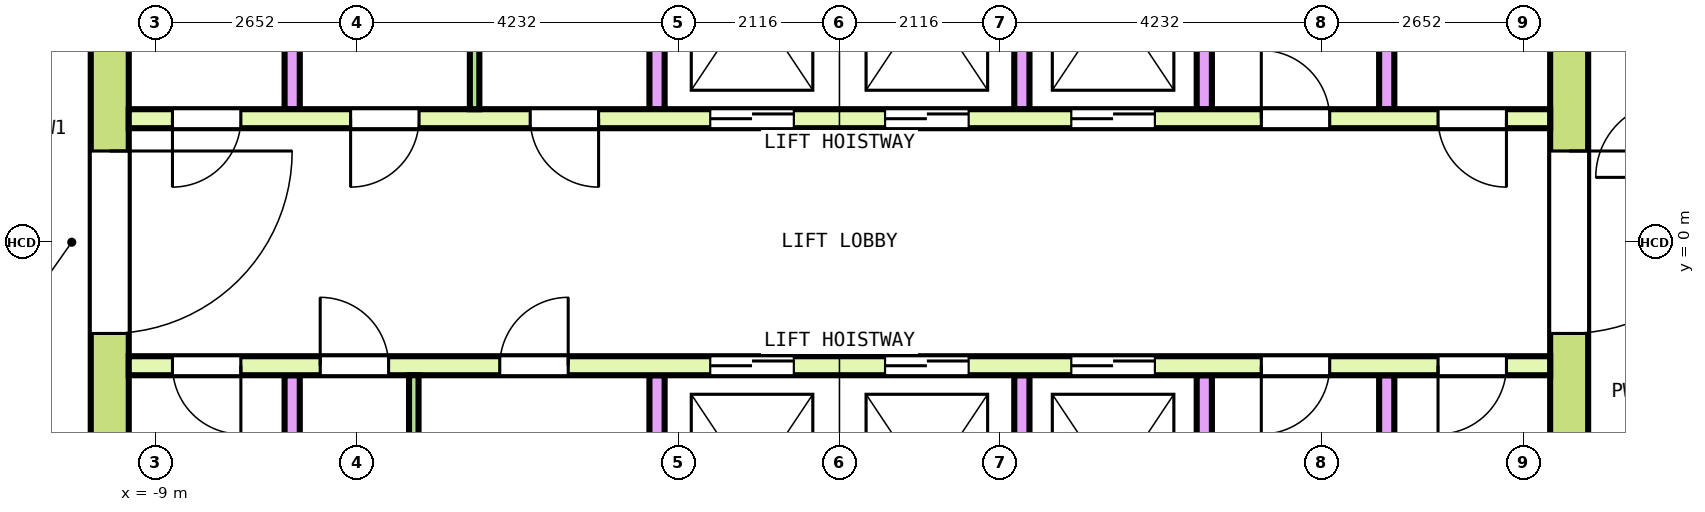
"""IFC4 building model, lengths in metres.
Left out: names, types, materials, properties, quantities, classifications, styles, units other than length and angle.
Written with IfcOpenShell. Run it as: python <this file> out.ifc"""

import sys

from ifc_helpers import new_model, si_unit, direction, frame, frame_2d, origin, place, context, subcontext, project, spatial, rectangle, extrude, element, fill, save


model = new_model("IFC4")
c1 = context("Model", 3, precision=1e-05, world=origin(), true_north=direction((0.0, 1.0)))
c2 = subcontext(c1, "Body", "Model", "MODEL_VIEW")
j1 = project(units=[si_unit("LENGTHUNIT", "METRE"), si_unit("PLANEANGLEUNIT", "RADIAN")], contexts=[c1])
p1 = place(None, origin())
s1 = spatial("IfcSite", under=j1, at=p1, CompositionType="ELEMENT")
p2 = place(p1, origin())
s2 = spatial("IfcBuilding", under=s1, at=p2, CompositionType="ELEMENT")
p3 = place(p2, frame((0.0, 0.0, 267.0)))
s3 = spatial("IfcBuildingStorey", under=s2, at=p3, CompositionType="ELEMENT", Elevation=267.0)
p4 = place(p3, frame((-9.6, -7.85, 0.0), z_axis=(0.0, 0.0, 1.0), x_axis=(0.0, 1.0, 0.0)))
e1 = element("IfcWall", 1, at=p4, inside=s3, PredefinedType="SHEAR", context=c2, shape_type="SweptSolid", body=[
    extrude(rectangle(XDim=15.7, YDim=0.5, at=frame_2d((7.85, 0.0))), origin(), (0.0, 0.0, 1.0), 3.7),
])
p5 = place(p4, frame((6.65, 0.0, 0.0)))
e2 = element("IfcOpeningElement", 2, at=p5, cuts=e1, PredefinedType="OPENING", context=c2, shape_type="SweptSolid", body=[
    extrude(rectangle(XDim=2.4, YDim=2.1, at=frame_2d((1.2, 1.05))), frame((0.0, 0.26, 0.0), z_axis=(0.0, -1.0, 0.0), x_axis=(1.0, 0.0, 0.0)), (0.0, 0.0, 1.0), 0.52),
])
p6 = place(p4, frame((13.55, 0.0, 0.0)))
e3 = element("IfcOpeningElement", 3, at=p6, cuts=e1, PredefinedType="OPENING", context=c2, shape_type="SweptSolid", body=[
    extrude(rectangle(XDim=1.2, YDim=2.1, at=frame_2d((0.6, 1.05))), frame((0.0, 0.26, 0.0), z_axis=(0.0, -1.0, 0.0), x_axis=(1.0, 0.0, 0.0)), (0.0, 0.0, 1.0), 0.52),
])
p7 = place(p4, frame((0.95, 0.0, 0.0)))
e4 = element("IfcOpeningElement", 4, at=p7, cuts=e1, PredefinedType="OPENING", context=c2, shape_type="SweptSolid", body=[
    extrude(rectangle(XDim=1.2, YDim=2.1, at=frame_2d((0.6, 1.05))), frame((0.0, 0.26, 0.0), z_axis=(0.0, -1.0, 0.0), x_axis=(1.0, 0.0, 0.0)), (0.0, 0.0, 1.0), 0.52),
])
p8 = place(p3, frame((9.6, -7.85, 0.0), z_axis=(0.0, 0.0, 1.0), x_axis=(0.0, 1.0, 0.0)))
e5 = element("IfcWall", 5, at=p8, inside=s3, PredefinedType="SHEAR", context=c2, shape_type="SweptSolid", body=[
    extrude(rectangle(XDim=15.7, YDim=0.5, at=frame_2d((7.85, 0.0))), origin(), (0.0, 0.0, 1.0), 3.7),
])
p9 = place(p8, frame((6.65, 0.0, 0.0)))
e6 = element("IfcOpeningElement", 6, at=p9, cuts=e5, PredefinedType="OPENING", context=c2, shape_type="SweptSolid", body=[
    extrude(rectangle(XDim=2.4, YDim=2.1, at=frame_2d((1.2, 1.05))), frame((0.0, 0.26, 0.0), z_axis=(0.0, -1.0, 0.0), x_axis=(1.0, 0.0, 0.0)), (0.0, 0.0, 1.0), 0.52),
])
p10 = place(p8, frame((13.55, 0.0, 0.0)))
e7 = element("IfcOpeningElement", 7, at=p10, cuts=e5, PredefinedType="OPENING", context=c2, shape_type="SweptSolid", body=[
    extrude(rectangle(XDim=1.2, YDim=2.1, at=frame_2d((0.6, 1.05))), frame((0.0, 0.26, 0.0), z_axis=(0.0, -1.0, 0.0), x_axis=(1.0, 0.0, 0.0)), (0.0, 0.0, 1.0), 0.52),
])
p11 = place(p8, frame((1.05, 0.0, 0.0)))
e8 = element("IfcOpeningElement", 8, at=p11, cuts=e5, PredefinedType="OPENING", context=c2, shape_type="SweptSolid", body=[
    extrude(rectangle(XDim=1.0, YDim=2.1, at=frame_2d((0.5, 1.05))), frame((0.0, 0.26, 0.0), z_axis=(0.0, -1.0, 0.0), x_axis=(1.0, 0.0, 0.0)), (0.0, 0.0, 1.0), 0.52),
])
p12 = place(p3, frame((-9.35, 1.625, 0.0), z_axis=(0.0, 0.0, 1.0), x_axis=(1.0, 0.0, 0.0)))
e9 = element("IfcWall", 9, at=p12, inside=s3, PredefinedType="SOLIDWALL", context=c2, shape_type="SweptSolid", body=[
    extrude(rectangle(XDim=18.7, YDim=0.25, at=frame_2d((9.35, 0.0))), origin(), (0.0, 0.0, 1.0), 3.7),
])
p13 = place(p12, frame((7.65, 0.0, 0.0)))
e10 = element("IfcOpeningElement", 10, at=p13, cuts=e9, PredefinedType="OPENING", context=c2, shape_type="SweptSolid", body=[
    extrude(rectangle(XDim=1.1, YDim=2.1, at=frame_2d((0.55, 1.05))), frame((0.0, 0.135, 0.0), z_axis=(0.0, -1.0, 0.0), x_axis=(1.0, 0.0, 0.0)), (0.0, 0.0, 1.0), 0.27),
])
p14 = place(p12, frame((9.95, 0.0, 0.0)))
e11 = element("IfcOpeningElement", 11, at=p14, cuts=e9, PredefinedType="OPENING", context=c2, shape_type="SweptSolid", body=[
    extrude(rectangle(XDim=1.1, YDim=2.1, at=frame_2d((0.55, 1.05))), frame((0.0, 0.135, 0.0), z_axis=(0.0, -1.0, 0.0), x_axis=(1.0, 0.0, 0.0)), (0.0, 0.0, 1.0), 0.27),
])
p15 = place(p12, frame((12.4, 0.0, 0.0)))
e12 = element("IfcOpeningElement", 12, at=p15, cuts=e9, PredefinedType="OPENING", context=c2, shape_type="SweptSolid", body=[
    extrude(rectangle(XDim=1.1, YDim=2.1, at=frame_2d((0.55, 1.05))), frame((0.0, 0.135, 0.0), z_axis=(0.0, -1.0, 0.0), x_axis=(1.0, 0.0, 0.0)), (0.0, 0.0, 1.0), 0.27),
])
p16 = place(p12, frame((0.575, 0.0, 0.0)))
e13 = element("IfcOpeningElement", 13, at=p16, cuts=e9, PredefinedType="OPENING", context=c2, shape_type="SweptSolid", body=[
    extrude(rectangle(XDim=0.9, YDim=2.1, at=frame_2d((0.45, 1.05))), frame((0.0, 0.135, 0.0), z_axis=(0.0, -1.0, 0.0), x_axis=(1.0, 0.0, 0.0)), (0.0, 0.0, 1.0), 0.27),
])
p17 = place(p12, frame((2.919, 0.0, 0.0)))
e14 = element("IfcOpeningElement", 14, at=p17, cuts=e9, PredefinedType="OPENING", context=c2, shape_type="SweptSolid", body=[
    extrude(rectangle(XDim=0.9, YDim=2.1, at=frame_2d((0.45, 1.05))), frame((0.0, 0.135, 0.0), z_axis=(0.0, -1.0, 0.0), x_axis=(1.0, 0.0, 0.0)), (0.0, 0.0, 1.0), 0.27),
])
p18 = place(p12, frame((5.281, 0.0, 0.0)))
e15 = element("IfcOpeningElement", 15, at=p18, cuts=e9, PredefinedType="OPENING", context=c2, shape_type="SweptSolid", body=[
    extrude(rectangle(XDim=0.9, YDim=2.1, at=frame_2d((0.45, 1.05))), frame((0.0, 0.135, 0.0), z_axis=(0.0, -1.0, 0.0), x_axis=(1.0, 0.0, 0.0)), (0.0, 0.0, 1.0), 0.27),
])
p19 = place(p12, frame((14.9, 0.0, 0.0)))
e16 = element("IfcOpeningElement", 16, at=p19, cuts=e9, PredefinedType="OPENING", context=c2, shape_type="SweptSolid", body=[
    extrude(rectangle(XDim=0.9, YDim=2.1, at=frame_2d((0.45, 1.05))), frame((0.0, 0.135, 0.0), z_axis=(0.0, -1.0, 0.0), x_axis=(1.0, 0.0, 0.0)), (0.0, 0.0, 1.0), 0.27),
])
p20 = place(p12, frame((17.225, 0.0, 0.0)))
e17 = element("IfcOpeningElement", 17, at=p20, cuts=e9, PredefinedType="OPENING", context=c2, shape_type="SweptSolid", body=[
    extrude(rectangle(XDim=0.9, YDim=2.1, at=frame_2d((0.45, 1.05))), frame((0.0, 0.135, 0.0), z_axis=(0.0, -1.0, 0.0), x_axis=(1.0, 0.0, 0.0)), (0.0, 0.0, 1.0), 0.27),
])
for number, where, z_axis, x_axis in (
    (18, (-7.2, 1.75, 0.0), (0.0, 0.0, 1.0), (0.0, 1.0, 0.0)),
    (19, (-2.4, 1.75, 0.0), (0.0, 0.0, 1.0), (0.0, 1.0, 0.0)),
    (20, (2.4, 1.75, 0.0), (0.0, 0.0, 1.0), (0.0, 1.0, 0.0)),
    (21, (4.8, 1.75, 0.0), (0.0, 0.0, 1.0), (0.0, 1.0, 0.0)),
    (22, (7.2, 1.75, 0.0), (0.0, 0.0, 1.0), (0.0, 1.0, 0.0)),
):
    element("IfcWall", number, at=place(p3, frame(where, z_axis=z_axis, x_axis=x_axis)), inside=s3, PredefinedType="SOLIDWALL", context=c2, shape_type="SweptSolid", body=[
        extrude(rectangle(XDim=2.9, YDim=0.2, at=frame_2d((1.45, 0.0))), origin(), (0.0, 0.0, 1.0), 3.7),
    ])
p21 = place(p3, frame((-9.35, -1.625, 0.0), z_axis=(0.0, 0.0, 1.0), x_axis=(1.0, 0.0, 0.0)))
e23 = element("IfcWall", 23, at=p21, inside=s3, PredefinedType="SOLIDWALL", context=c2, shape_type="SweptSolid", body=[
    extrude(rectangle(XDim=18.7, YDim=0.25, at=frame_2d((9.35, 0.0))), origin(), (0.0, 0.0, 1.0), 3.7),
])
p22 = place(p21, frame((7.65, 0.0, 0.0)))
e24 = element("IfcOpeningElement", 24, at=p22, cuts=e23, PredefinedType="OPENING", context=c2, shape_type="SweptSolid", body=[
    extrude(rectangle(XDim=1.1, YDim=2.1, at=frame_2d((0.55, 1.05))), frame((0.0, 0.135, 0.0), z_axis=(0.0, -1.0, 0.0), x_axis=(1.0, 0.0, 0.0)), (0.0, 0.0, 1.0), 0.27),
])
p23 = place(p21, frame((9.95, 0.0, 0.0)))
e25 = element("IfcOpeningElement", 25, at=p23, cuts=e23, PredefinedType="OPENING", context=c2, shape_type="SweptSolid", body=[
    extrude(rectangle(XDim=1.1, YDim=2.1, at=frame_2d((0.55, 1.05))), frame((0.0, 0.135, 0.0), z_axis=(0.0, -1.0, 0.0), x_axis=(1.0, 0.0, 0.0)), (0.0, 0.0, 1.0), 0.27),
])
p24 = place(p21, frame((12.4, 0.0, 0.0)))
e26 = element("IfcOpeningElement", 26, at=p24, cuts=e23, PredefinedType="OPENING", context=c2, shape_type="SweptSolid", body=[
    extrude(rectangle(XDim=1.1, YDim=2.1, at=frame_2d((0.55, 1.05))), frame((0.0, 0.135, 0.0), z_axis=(0.0, -1.0, 0.0), x_axis=(1.0, 0.0, 0.0)), (0.0, 0.0, 1.0), 0.27),
])
p25 = place(p21, frame((0.575, 0.0, 0.0)))
e27 = element("IfcOpeningElement", 27, at=p25, cuts=e23, PredefinedType="OPENING", context=c2, shape_type="SweptSolid", body=[
    extrude(rectangle(XDim=0.9, YDim=2.1, at=frame_2d((0.45, 1.05))), frame((0.0, 0.135, 0.0), z_axis=(0.0, -1.0, 0.0), x_axis=(1.0, 0.0, 0.0)), (0.0, 0.0, 1.0), 0.27),
])
p26 = place(p21, frame((2.519, 0.0, 0.0)))
e28 = element("IfcOpeningElement", 28, at=p26, cuts=e23, PredefinedType="OPENING", context=c2, shape_type="SweptSolid", body=[
    extrude(rectangle(XDim=0.9, YDim=2.1, at=frame_2d((0.45, 1.05))), frame((0.0, 0.135, 0.0), z_axis=(0.0, -1.0, 0.0), x_axis=(1.0, 0.0, 0.0)), (0.0, 0.0, 1.0), 0.27),
])
p27 = place(p21, frame((4.881, 0.0, 0.0)))
e29 = element("IfcOpeningElement", 29, at=p27, cuts=e23, PredefinedType="OPENING", context=c2, shape_type="SweptSolid", body=[
    extrude(rectangle(XDim=0.9, YDim=2.1, at=frame_2d((0.45, 1.05))), frame((0.0, 0.135, 0.0), z_axis=(0.0, -1.0, 0.0), x_axis=(1.0, 0.0, 0.0)), (0.0, 0.0, 1.0), 0.27),
])
p28 = place(p21, frame((14.9, 0.0, 0.0)))
e30 = element("IfcOpeningElement", 30, at=p28, cuts=e23, PredefinedType="OPENING", context=c2, shape_type="SweptSolid", body=[
    extrude(rectangle(XDim=0.9, YDim=2.1, at=frame_2d((0.45, 1.05))), frame((0.0, 0.135, 0.0), z_axis=(0.0, -1.0, 0.0), x_axis=(1.0, 0.0, 0.0)), (0.0, 0.0, 1.0), 0.27),
])
p29 = place(p21, frame((17.225, 0.0, 0.0)))
e31 = element("IfcOpeningElement", 31, at=p29, cuts=e23, PredefinedType="OPENING", context=c2, shape_type="SweptSolid", body=[
    extrude(rectangle(XDim=0.9, YDim=2.1, at=frame_2d((0.45, 1.05))), frame((0.0, 0.135, 0.0), z_axis=(0.0, -1.0, 0.0), x_axis=(1.0, 0.0, 0.0)), (0.0, 0.0, 1.0), 0.27),
])
for number, where, z_axis, x_axis in (
    (32, (-7.2, -4.65, 0.0), (0.0, 0.0, 1.0), (0.0, 1.0, 0.0)),
    (33, (-2.4, -4.65, 0.0), (0.0, 0.0, 1.0), (0.0, 1.0, 0.0)),
    (34, (2.4, -4.65, 0.0), (0.0, 0.0, 1.0), (0.0, 1.0, 0.0)),
    (35, (4.8, -4.65, 0.0), (0.0, 0.0, 1.0), (0.0, 1.0, 0.0)),
    (36, (7.2, -4.65, 0.0), (0.0, 0.0, 1.0), (0.0, 1.0, 0.0)),
):
    element("IfcWall", number, at=place(p3, frame(where, z_axis=z_axis, x_axis=x_axis)), inside=s3, PredefinedType="SOLIDWALL", context=c2, shape_type="SweptSolid", body=[
        extrude(rectangle(XDim=2.9, YDim=0.2, at=frame_2d((1.45, 0.0))), origin(), (0.0, 0.0, 1.0), 3.7),
    ])
for number, where, z_axis, x_axis in (
    (37, (-4.8, 1.75, 0.0), (0.0, 0.0, 1.0), (0.0, 1.0, 0.0)),
    (38, (-5.6, -4.65, 0.0), (0.0, 0.0, 1.0), (0.0, 1.0, 0.0)),
):
    element("IfcWall", number, at=place(p3, frame(where, z_axis=z_axis, x_axis=x_axis)), inside=s3, PredefinedType="PARTITIONING", context=c2, shape_type="SweptSolid", body=[
        extrude(rectangle(XDim=2.9, YDim=0.125, at=frame_2d((1.45, 0.0))), origin(), (0.0, 0.0, 1.0), 3.7),
    ])
p30 = place(p13, origin())
e39 = element("IfcDoor", 39, at=p30, inside=s3, OperationType="DOUBLE_DOOR_SLIDING", PredefinedType="DOOR", context=c2, shape_type="SweptSolid", body=[
    extrude(rectangle(XDim=1.1, YDim=2.1, at=frame_2d((0.55, 1.05))), frame((0.0, 0.075, 0.0), z_axis=(0.0, -1.0, 0.0), x_axis=(1.0, 0.0, 0.0)), (0.0, 0.0, 1.0), 0.15),
])
fill(e10, e39)
p31 = place(p14, origin())
e40 = element("IfcDoor", 40, at=p31, inside=s3, OperationType="DOUBLE_DOOR_SLIDING", PredefinedType="DOOR", context=c2, shape_type="SweptSolid", body=[
    extrude(rectangle(XDim=1.1, YDim=2.1, at=frame_2d((0.55, 1.05))), frame((0.0, 0.075, 0.0), z_axis=(0.0, -1.0, 0.0), x_axis=(1.0, 0.0, 0.0)), (0.0, 0.0, 1.0), 0.15),
])
fill(e11, e40)
p32 = place(p15, origin())
e41 = element("IfcDoor", 41, at=p32, inside=s3, OperationType="DOUBLE_DOOR_SLIDING", PredefinedType="DOOR", context=c2, shape_type="SweptSolid", body=[
    extrude(rectangle(XDim=1.1, YDim=2.1, at=frame_2d((0.55, 1.05))), frame((0.0, 0.075, 0.0), z_axis=(0.0, -1.0, 0.0), x_axis=(1.0, 0.0, 0.0)), (0.0, 0.0, 1.0), 0.15),
])
fill(e12, e41)
p33 = place(p22, origin())
e42 = element("IfcDoor", 42, at=p33, inside=s3, OperationType="DOUBLE_DOOR_SLIDING", PredefinedType="DOOR", context=c2, shape_type="SweptSolid", body=[
    extrude(rectangle(XDim=1.1, YDim=2.1, at=frame_2d((0.55, 1.05))), frame((0.0, 0.075, 0.0), z_axis=(0.0, -1.0, 0.0), x_axis=(1.0, 0.0, 0.0)), (0.0, 0.0, 1.0), 0.15),
])
fill(e24, e42)
p34 = place(p23, origin())
e43 = element("IfcDoor", 43, at=p34, inside=s3, OperationType="DOUBLE_DOOR_SLIDING", PredefinedType="DOOR", context=c2, shape_type="SweptSolid", body=[
    extrude(rectangle(XDim=1.1, YDim=2.1, at=frame_2d((0.55, 1.05))), frame((0.0, 0.075, 0.0), z_axis=(0.0, -1.0, 0.0), x_axis=(1.0, 0.0, 0.0)), (0.0, 0.0, 1.0), 0.15),
])
fill(e25, e43)
p35 = place(p24, origin())
e44 = element("IfcDoor", 44, at=p35, inside=s3, OperationType="DOUBLE_DOOR_SLIDING", PredefinedType="DOOR", context=c2, shape_type="SweptSolid", body=[
    extrude(rectangle(XDim=1.1, YDim=2.1, at=frame_2d((0.55, 1.05))), frame((0.0, 0.075, 0.0), z_axis=(0.0, -1.0, 0.0), x_axis=(1.0, 0.0, 0.0)), (0.0, 0.0, 1.0), 0.15),
])
fill(e26, e44)
p36 = place(p5, origin())
e45 = element("IfcDoor", 45, at=p36, inside=s3, OperationType="DOUBLE_DOOR_SINGLE_SWING", PredefinedType="DOOR", context=c2, shape_type="SweptSolid", body=[
    extrude(rectangle(XDim=2.4, YDim=2.1, at=frame_2d((1.2, 1.05))), frame((0.0, 0.2, 0.0), z_axis=(0.0, -1.0, 0.0), x_axis=(1.0, 0.0, 0.0)), (0.0, 0.0, 1.0), 0.4),
])
fill(e2, e45)
p37 = place(p9, origin())
e46 = element("IfcDoor", 46, at=p37, inside=s3, OperationType="DOUBLE_DOOR_SINGLE_SWING", PredefinedType="DOOR", context=c2, shape_type="SweptSolid", body=[
    extrude(rectangle(XDim=2.4, YDim=2.1, at=frame_2d((1.2, 1.05))), frame((0.0, 0.2, 0.0), z_axis=(0.0, -1.0, 0.0), x_axis=(1.0, 0.0, 0.0)), (0.0, 0.0, 1.0), 0.4),
])
fill(e6, e46)
p38 = place(p16, origin())
e47 = element("IfcDoor", 47, at=p38, inside=s3, OperationType="SINGLE_SWING_RIGHT", PredefinedType="DOOR", context=c2, shape_type="SweptSolid", body=[
    extrude(rectangle(XDim=0.9, YDim=2.1, at=frame_2d((0.45, 1.05))), frame((0.0, 0.075, 0.0), z_axis=(0.0, -1.0, 0.0), x_axis=(1.0, 0.0, 0.0)), (0.0, 0.0, 1.0), 0.15),
])
fill(e13, e47)
p39 = place(p17, origin())
e48 = element("IfcDoor", 48, at=p39, inside=s3, OperationType="SINGLE_SWING_LEFT", PredefinedType="DOOR", context=c2, shape_type="SweptSolid", body=[
    extrude(rectangle(XDim=0.9, YDim=2.1, at=frame_2d((0.45, 1.05))), frame((0.0, 0.075, 0.0), z_axis=(0.0, -1.0, 0.0), x_axis=(1.0, 0.0, 0.0)), (0.0, 0.0, 1.0), 0.15),
])
fill(e14, e48)
p40 = place(p18, origin())
e49 = element("IfcDoor", 49, at=p40, inside=s3, OperationType="SINGLE_SWING_RIGHT", PredefinedType="DOOR", context=c2, shape_type="SweptSolid", body=[
    extrude(rectangle(XDim=0.9, YDim=2.1, at=frame_2d((0.45, 1.05))), frame((0.0, 0.075, 0.0), z_axis=(0.0, -1.0, 0.0), x_axis=(1.0, 0.0, 0.0)), (0.0, 0.0, 1.0), 0.15),
])
fill(e15, e49)
p41 = place(p19, origin())
e50 = element("IfcDoor", 50, at=p41, inside=s3, OperationType="SINGLE_SWING_LEFT", PredefinedType="DOOR", context=c2, shape_type="SweptSolid", body=[
    extrude(rectangle(XDim=0.9, YDim=2.1, at=frame_2d((0.45, 1.05))), frame((0.0, 0.075, 0.0), z_axis=(0.0, -1.0, 0.0), x_axis=(1.0, 0.0, 0.0)), (0.0, 0.0, 1.0), 0.15),
])
fill(e16, e50)
p42 = place(p20, origin())
e51 = element("IfcDoor", 51, at=p42, inside=s3, OperationType="SINGLE_SWING_RIGHT", PredefinedType="DOOR", context=c2, shape_type="SweptSolid", body=[
    extrude(rectangle(XDim=0.9, YDim=2.1, at=frame_2d((0.45, 1.05))), frame((0.0, 0.075, 0.0), z_axis=(0.0, -1.0, 0.0), x_axis=(1.0, 0.0, 0.0)), (0.0, 0.0, 1.0), 0.15),
])
fill(e17, e51)
p43 = place(p25, origin())
e52 = element("IfcDoor", 52, at=p43, inside=s3, OperationType="SINGLE_SWING_LEFT", PredefinedType="DOOR", context=c2, shape_type="SweptSolid", body=[
    extrude(rectangle(XDim=0.9, YDim=2.1, at=frame_2d((0.45, 1.05))), frame((0.0, 0.075, 0.0), z_axis=(0.0, -1.0, 0.0), x_axis=(1.0, 0.0, 0.0)), (0.0, 0.0, 1.0), 0.15),
])
fill(e27, e52)
p44 = place(p26, origin())
e53 = element("IfcDoor", 53, at=p44, inside=s3, OperationType="SINGLE_SWING_RIGHT", PredefinedType="DOOR", context=c2, shape_type="SweptSolid", body=[
    extrude(rectangle(XDim=0.9, YDim=2.1, at=frame_2d((0.45, 1.05))), frame((0.0, 0.075, 0.0), z_axis=(0.0, -1.0, 0.0), x_axis=(1.0, 0.0, 0.0)), (0.0, 0.0, 1.0), 0.15),
])
fill(e28, e53)
p45 = place(p27, origin())
e54 = element("IfcDoor", 54, at=p45, inside=s3, OperationType="SINGLE_SWING_LEFT", PredefinedType="DOOR", context=c2, shape_type="SweptSolid", body=[
    extrude(rectangle(XDim=0.9, YDim=2.1, at=frame_2d((0.45, 1.05))), frame((0.0, 0.075, 0.0), z_axis=(0.0, -1.0, 0.0), x_axis=(1.0, 0.0, 0.0)), (0.0, 0.0, 1.0), 0.15),
])
fill(e29, e54)
p46 = place(p28, origin())
e55 = element("IfcDoor", 55, at=p46, inside=s3, OperationType="SINGLE_SWING_RIGHT", PredefinedType="DOOR", context=c2, shape_type="SweptSolid", body=[
    extrude(rectangle(XDim=0.9, YDim=2.1, at=frame_2d((0.45, 1.05))), frame((0.0, 0.075, 0.0), z_axis=(0.0, -1.0, 0.0), x_axis=(1.0, 0.0, 0.0)), (0.0, 0.0, 1.0), 0.15),
])
fill(e30, e55)
p47 = place(p29, origin())
e56 = element("IfcDoor", 56, at=p47, inside=s3, OperationType="SINGLE_SWING_LEFT", PredefinedType="DOOR", context=c2, shape_type="SweptSolid", body=[
    extrude(rectangle(XDim=0.9, YDim=2.1, at=frame_2d((0.45, 1.05))), frame((0.0, 0.075, 0.0), z_axis=(0.0, -1.0, 0.0), x_axis=(1.0, 0.0, 0.0)), (0.0, 0.0, 1.0), 0.15),
])
fill(e31, e56)
save(model, sys.argv[1])
